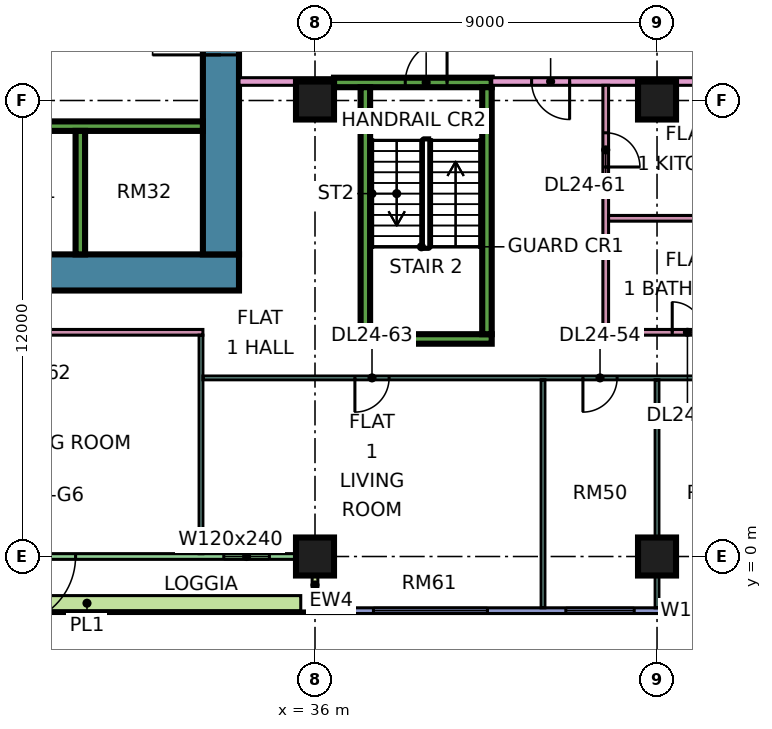
"""IFC4 building model, lengths in metres.
Left out: names, types, materials, properties, quantities, classifications, styles, units other than length and angle.
Written with IfcOpenShell. Run it as: python <this file> out.ifc"""

import sys

from ifc_helpers import new_model, si_unit, direction, frame, frame_2d, origin, origin_2d, place, context, subcontext, project, spatial, rectangle, extrude, element, fill, save


model = new_model("IFC4")
c1 = context("Model", 3, precision=1e-05, world=origin(), true_north=direction((0.0, 1.0)))
c2 = subcontext(c1, "Body", "Model", "MODEL_VIEW")
j1 = project(units=[si_unit("LENGTHUNIT", "METRE"), si_unit("PLANEANGLEUNIT", "RADIAN")], contexts=[c1])
p1 = place(None, origin())
s1 = spatial("IfcSite", under=j1, at=p1, CompositionType="ELEMENT")
p2 = place(p1, origin())
s2 = spatial("IfcBuilding", under=s1, at=p2, CompositionType="ELEMENT")
p3 = place(p2, frame((0.0, 0.0, 106.9)))
s3 = spatial("IfcBuildingStorey", under=s2, at=p3, CompositionType="ELEMENT", Elevation=106.9)
for number, where, z_axis, x_axis in (
    (1, (36.0, 0.0, 0.0), (0.0, 0.0, 1.0), (1.0, 0.0, 0.0)),
    (2, (36.0, 12.0, 0.0), (0.0, 0.0, 1.0), (1.0, 0.0, 0.0)),
    (3, (45.0, 0.0, 0.0), (0.0, 0.0, 1.0), (1.0, 0.0, 0.0)),
    (4, (45.0, 12.0, 0.0), (0.0, 0.0, 1.0), (1.0, 0.0, 0.0)),
):
    element("IfcColumn", number, at=place(p3, frame(where, z_axis=z_axis, x_axis=x_axis)), inside=s3, PredefinedType="COLUMN", context=c2, shape_type="SweptSolid", body=[
        extrude(rectangle(XDim=1.0, YDim=1.0, at=origin_2d()), origin(), (0.0, 0.0, 1.0), 3.75),
    ])
p4 = place(p3, frame((9.0, 7.475, 0.0), z_axis=(0.0, 0.0, 1.0), x_axis=(1.0, 0.0, 0.0)))
e5 = element("IfcWall", 5, at=p4, inside=s3, PredefinedType="SHEAR", context=c2, shape_type="SweptSolid", body=[
    extrude(rectangle(XDim=25.0, YDim=0.95, at=frame_2d((12.5, 0.0))), origin(), (0.0, 0.0, 1.0), 3.75),
])
p5 = place(p3, frame((33.525, 7.95, 0.0), z_axis=(0.0, 0.0, 1.0), x_axis=(0.0, 1.0, 0.0)))
e6 = element("IfcWall", 6, at=p5, inside=s3, PredefinedType="SHEAR", context=c2, shape_type="SweptSolid", body=[
    extrude(rectangle(XDim=11.1, YDim=0.95, at=frame_2d((5.55, 0.0))), origin(), (0.0, 0.0, 1.0), 3.75),
])
p6 = place(p5, frame((5.25, 0.0, 0.0)))
e7 = element("IfcOpeningElement", 7, at=p6, cuts=e6, PredefinedType="OPENING", context=c2, shape_type="SweptSolid", body=[
    extrude(rectangle(XDim=1.8, YDim=2.4, at=frame_2d((0.9, 1.2))), frame((0.0, 0.485, 0.0), z_axis=(0.0, -1.0, 0.0), x_axis=(1.0, 0.0, 0.0)), (0.0, 0.0, 1.0), 0.97),
])
p7 = place(p3, frame((13.45, 11.325, 0.0), z_axis=(0.0, 0.0, 1.0), x_axis=(1.0, 0.0, 0.0)))
e8 = element("IfcWall", 8, at=p7, inside=s3, PredefinedType="SHEAR", context=c2, shape_type="SweptSolid", body=[
    extrude(rectangle(XDim=19.6, YDim=0.25, at=frame_2d((9.8, 0.0))), origin(), (0.0, 0.0, 1.0), 3.75),
])
p8 = place(p7, frame((0.65, 0.0, 0.0)))
e9 = element("IfcOpeningElement", 9, at=p8, cuts=e8, PredefinedType="OPENING", context=c2, shape_type="SweptSolid", body=[
    extrude(rectangle(XDim=1.2, YDim=2.2, at=frame_2d((0.6, 1.1))), frame((0.0, 0.135, 0.0), z_axis=(0.0, -1.0, 0.0), x_axis=(1.0, 0.0, 0.0)), (0.0, 0.0, 1.0), 0.27),
])
p9 = place(p7, frame((3.4, 0.0, 0.0)))
e10 = element("IfcOpeningElement", 10, at=p9, cuts=e8, PredefinedType="OPENING", context=c2, shape_type="SweptSolid", body=[
    extrude(rectangle(XDim=1.2, YDim=2.2, at=frame_2d((0.6, 1.1))), frame((0.0, 0.135, 0.0), z_axis=(0.0, -1.0, 0.0), x_axis=(1.0, 0.0, 0.0)), (0.0, 0.0, 1.0), 0.27),
])
p10 = place(p7, frame((6.15, 0.0, 0.0)))
e11 = element("IfcOpeningElement", 11, at=p10, cuts=e8, PredefinedType="OPENING", context=c2, shape_type="SweptSolid", body=[
    extrude(rectangle(XDim=1.2, YDim=2.2, at=frame_2d((0.6, 1.1))), frame((0.0, 0.135, 0.0), z_axis=(0.0, -1.0, 0.0), x_axis=(1.0, 0.0, 0.0)), (0.0, 0.0, 1.0), 0.27),
])
p11 = place(p7, frame((8.9, 0.0, 0.0)))
e12 = element("IfcOpeningElement", 12, at=p11, cuts=e8, PredefinedType="OPENING", context=c2, shape_type="SweptSolid", body=[
    extrude(rectangle(XDim=1.2, YDim=2.2, at=frame_2d((0.6, 1.1))), frame((0.0, 0.135, 0.0), z_axis=(0.0, -1.0, 0.0), x_axis=(1.0, 0.0, 0.0)), (0.0, 0.0, 1.0), 0.27),
])
p12 = place(p3, frame((29.825, 7.95, 0.0), z_axis=(0.0, 0.0, 1.0), x_axis=(0.0, 1.0, 0.0)))
e13 = element("IfcWall", 13, at=p12, inside=s3, PredefinedType="SHEAR", context=c2, shape_type="SweptSolid", body=[
    extrude(rectangle(XDim=3.25, YDim=0.25, at=frame_2d((1.625, 0.0))), origin(), (0.0, 0.0, 1.0), 3.75),
])
p13 = place(p3, frame((37.2, 5.725, 0.0), z_axis=(0.0, 0.0, 1.0), x_axis=(1.0, 0.0, 0.0)))
e14 = element("IfcWall", 14, at=p13, inside=s3, PredefinedType="SHEAR", context=c2, shape_type="SweptSolid", body=[
    extrude(rectangle(XDim=3.45, YDim=0.25, at=frame_2d((1.725, 0.0))), origin(), (0.0, 0.0, 1.0), 3.75),
])
p14 = place(p3, frame((36.5, 12.475, 0.0), z_axis=(0.0, 0.0, 1.0), x_axis=(1.0, 0.0, 0.0)))
e15 = element("IfcWall", 15, at=p14, inside=s3, PredefinedType="SHEAR", context=c2, shape_type="SweptSolid", body=[
    extrude(rectangle(XDim=4.15, YDim=0.25, at=frame_2d((2.075, 0.0))), origin(), (0.0, 0.0, 1.0), 3.75),
])
p15 = place(p14, frame((1.875, 0.0, 0.0)))
e16 = element("IfcOpeningElement", 16, at=p15, cuts=e15, PredefinedType="OPENING", context=c2, shape_type="SweptSolid", body=[
    extrude(rectangle(XDim=1.1, YDim=2.2, at=frame_2d((0.55, 1.1))), frame((0.0, 0.135, 0.0), z_axis=(0.0, -1.0, 0.0), x_axis=(1.0, 0.0, 0.0)), (0.0, 0.0, 1.0), 0.27),
])
for number, where, z_axis, x_axis in (
    (17, (37.325, 5.85, 0.0), (0.0, 0.0, 1.0), (0.0, 1.0, 0.0)),
    (18, (40.525, 5.85, 0.0), (0.0, 0.0, 1.0), (0.0, 1.0, 0.0)),
):
    element("IfcWall", number, at=place(p3, frame(where, z_axis=z_axis, x_axis=x_axis)), inside=s3, PredefinedType="SHEAR", context=c2, shape_type="SweptSolid", body=[
        extrude(rectangle(XDim=6.5, YDim=0.25, at=frame_2d((3.25, 0.0))), origin(), (0.0, 0.0, 1.0), 3.75),
    ])
p16 = place(p3, frame((24.075, 0.0, 0.0), z_axis=(0.0, 0.0, 1.0), x_axis=(1.0, 0.0, 0.0)))
e19 = element("IfcWall", 19, at=p16, inside=s3, PredefinedType="SOLIDWALL", context=c2, shape_type="SweptSolid", body=[
    extrude(rectangle(XDim=11.85, YDim=0.15, at=frame_2d((5.925, 0.0))), origin(), (0.0, 0.0, 1.0), 3.35),
])
p17 = place(p16, frame((3.825, 0.0, 0.0)))
e20 = element("IfcOpeningElement", 20, at=p17, cuts=e19, PredefinedType="OPENING", context=c2, shape_type="SweptSolid", body=[
    extrude(rectangle(XDim=1.8, YDim=2.4, at=frame_2d((0.9, 1.2))), frame((0.0, 0.085, 0.0), z_axis=(0.0, -1.0, 0.0), x_axis=(1.0, 0.0, 0.0)), (0.0, 0.0, 1.0), 0.17),
])
p18 = place(p16, frame((9.525, 0.0, 0.45)))
e21 = element("IfcOpeningElement", 21, at=p18, cuts=e19, PredefinedType="OPENING", context=c2, shape_type="SweptSolid", body=[
    extrude(rectangle(XDim=1.2, YDim=2.4, at=frame_2d((0.6, 1.2))), frame((0.0, 0.085, 0.0), z_axis=(0.0, -1.0, 0.0), x_axis=(1.0, 0.0, 0.0)), (0.0, 0.0, 1.0), 0.17),
])
p19 = place(p3, frame((36.0, -1.5, 0.0), z_axis=(0.0, 0.0, 1.0), x_axis=(0.0, 1.0, 0.0)))
e22 = element("IfcWall", 22, at=p19, inside=s3, PredefinedType="SOLIDWALL", context=c2, shape_type="SweptSolid", body=[
    extrude(rectangle(XDim=1.5, YDim=0.15, at=frame_2d((0.75, 0.0))), origin(), (0.0, 0.0, 1.0), 3.35),
])
p20 = place(p3, frame((36.075, -1.425, 0.0), z_axis=(0.0, 0.0, 1.0), x_axis=(1.0, 0.0, 0.0)))
e23 = element("IfcWall", 23, at=p20, inside=s3, PredefinedType="SOLIDWALL", context=c2, shape_type="SweptSolid", body=[
    extrude(rectangle(XDim=11.85, YDim=0.15, at=frame_2d((5.925, 0.0))), origin(), (0.0, 0.0, 1.0), 3.35),
])
p21 = place(p20, frame((1.462, 0.0, 0.45)))
e24 = element("IfcOpeningElement", 24, at=p21, cuts=e23, PredefinedType="OPENING", context=c2, shape_type="SweptSolid", body=[
    extrude(rectangle(XDim=3.0, YDim=2.4, at=frame_2d((1.5, 1.2))), frame((0.0, 0.085, 0.0), z_axis=(0.0, -1.0, 0.0), x_axis=(1.0, 0.0, 0.0)), (0.0, 0.0, 1.0), 0.17),
])
p22 = place(p20, frame((6.525, 0.0, 0.45)))
e25 = element("IfcOpeningElement", 25, at=p22, cuts=e23, PredefinedType="OPENING", context=c2, shape_type="SweptSolid", body=[
    extrude(rectangle(XDim=1.8, YDim=2.4, at=frame_2d((0.9, 1.2))), frame((0.0, 0.085, 0.0), z_axis=(0.0, -1.0, 0.0), x_axis=(1.0, 0.0, 0.0)), (0.0, 0.0, 1.0), 0.17),
])
p23 = place(p20, frame((9.488, 0.0, 0.45)))
e26 = element("IfcOpeningElement", 26, at=p23, cuts=e23, PredefinedType="OPENING", context=c2, shape_type="SweptSolid", body=[
    extrude(rectangle(XDim=1.8, YDim=2.4, at=frame_2d((0.9, 1.2))), frame((0.0, 0.085, 0.0), z_axis=(0.0, -1.0, 0.0), x_axis=(1.0, 0.0, 0.0)), (0.0, 0.0, 1.0), 0.17),
])
p24 = place(p3, frame((24.375, -1.229, 0.0), z_axis=(0.0, 0.0, 1.0), x_axis=(1.0, 0.0, 0.0)))
e27 = element("IfcWall", 27, at=p24, inside=s3, PredefinedType="SOLIDWALL", context=c2, shape_type="SweptSolid", body=[
    extrude(rectangle(XDim=11.25, YDim=0.4, at=frame_2d((5.625, 0.0))), origin(), (0.0, 0.0, 1.0), 0.7),
])
p25 = place(p3, frame((11.95, 5.9, 0.0), z_axis=(0.0, 0.0, 1.0), x_axis=(1.0, 0.0, 0.0)))
e28 = element("IfcWall", 28, at=p25, inside=s3, PredefinedType="PARTITIONING", context=c2, shape_type="SweptSolid", body=[
    extrude(rectangle(XDim=21.1, YDim=0.15, at=frame_2d((10.55, 0.0))), origin(), (0.0, 0.0, 1.0), 3.35),
])
p26 = place(p25, frame((1.1, 0.0, 0.0)))
e29 = element("IfcOpeningElement", 29, at=p26, cuts=e28, PredefinedType="OPENING", context=c2, shape_type="SweptSolid", body=[
    extrude(rectangle(XDim=0.9, YDim=2.1, at=frame_2d((0.45, 1.05))), frame((0.0, 0.085, 0.0), z_axis=(0.0, -1.0, 0.0), x_axis=(1.0, 0.0, 0.0)), (0.0, 0.0, 1.0), 0.17),
])
p27 = place(p25, frame((4.1, 0.0, 0.0)))
e30 = element("IfcOpeningElement", 30, at=p27, cuts=e28, PredefinedType="OPENING", context=c2, shape_type="SweptSolid", body=[
    extrude(rectangle(XDim=0.9, YDim=2.1, at=frame_2d((0.45, 1.05))), frame((0.0, 0.085, 0.0), z_axis=(0.0, -1.0, 0.0), x_axis=(1.0, 0.0, 0.0)), (0.0, 0.0, 1.0), 0.17),
])
p28 = place(p25, frame((10.1, 0.0, 0.0)))
e31 = element("IfcOpeningElement", 31, at=p28, cuts=e28, PredefinedType="OPENING", context=c2, shape_type="SweptSolid", body=[
    extrude(rectangle(XDim=0.9, YDim=2.1, at=frame_2d((0.45, 1.05))), frame((0.0, 0.085, 0.0), z_axis=(0.0, -1.0, 0.0), x_axis=(1.0, 0.0, 0.0)), (0.0, 0.0, 1.0), 0.17),
])
p29 = place(p25, frame((16.1, 0.0, 0.0)))
e32 = element("IfcOpeningElement", 32, at=p29, cuts=e28, PredefinedType="OPENING", context=c2, shape_type="SweptSolid", body=[
    extrude(rectangle(XDim=0.9, YDim=2.1, at=frame_2d((0.45, 1.05))), frame((0.0, 0.085, 0.0), z_axis=(0.0, -1.0, 0.0), x_axis=(1.0, 0.0, 0.0)), (0.0, 0.0, 1.0), 0.17),
])
p30 = place(p3, frame((33.0, 0.074, 0.0), z_axis=(0.0, 0.0, 1.0), x_axis=(0.0, 1.0, 0.0)))
e33 = element("IfcWall", 33, at=p30, inside=s3, PredefinedType="PARTITIONING", context=c2, shape_type="SweptSolid", body=[
    extrude(rectangle(XDim=5.751, YDim=0.1, at=frame_2d((2.875, 0.0))), origin(), (0.0, 0.0, 1.0), 3.35),
])
p31 = place(p3, frame((33.05, 4.7, 0.0), z_axis=(0.0, 0.0, 1.0), x_axis=(1.0, 0.0, 0.0)))
e34 = element("IfcWall", 34, at=p31, inside=s3, PredefinedType="PARTITIONING", context=c2, shape_type="SweptSolid", body=[
    extrude(rectangle(XDim=14.85, YDim=0.1, at=frame_2d((7.425, 0.0))), origin(), (0.0, 0.0, 1.0), 3.35),
])
p32 = place(p31, frame((10.0, 0.0, 0.0)))
e35 = element("IfcOpeningElement", 35, at=p32, cuts=e34, PredefinedType="OPENING", context=c2, shape_type="SweptSolid", body=[
    extrude(rectangle(XDim=0.9, YDim=2.1, at=frame_2d((0.45, 1.05))), frame((0.0, 0.06, 0.0), z_axis=(0.0, -1.0, 0.0), x_axis=(1.0, 0.0, 0.0)), (0.0, 0.0, 1.0), 0.12),
])
p33 = place(p31, frame((13.0, 0.0, 0.0)))
e36 = element("IfcOpeningElement", 36, at=p33, cuts=e34, PredefinedType="OPENING", context=c2, shape_type="SweptSolid", body=[
    extrude(rectangle(XDim=0.9, YDim=2.1, at=frame_2d((0.45, 1.05))), frame((0.0, 0.06, 0.0), z_axis=(0.0, -1.0, 0.0), x_axis=(1.0, 0.0, 0.0)), (0.0, 0.0, 1.0), 0.12),
])
p34 = place(p31, frame((4.0, 0.0, 0.0)))
e37 = element("IfcOpeningElement", 37, at=p34, cuts=e34, PredefinedType="OPENING", context=c2, shape_type="SweptSolid", body=[
    extrude(rectangle(XDim=0.9, YDim=2.1, at=frame_2d((0.45, 1.05))), frame((0.0, 0.06, 0.0), z_axis=(0.0, -1.0, 0.0), x_axis=(1.0, 0.0, 0.0)), (0.0, 0.0, 1.0), 0.12),
])
p35 = place(p3, frame((34.0, 12.5, 0.0), z_axis=(0.0, 0.0, 1.0), x_axis=(1.0, 0.0, 0.0)))
e38 = element("IfcWall", 38, at=p35, inside=s3, PredefinedType="PARTITIONING", context=c2, shape_type="SweptSolid", body=[
    extrude(rectangle(XDim=2.501, YDim=0.2, at=frame_2d((1.25, 0.0))), origin(), (0.0, 0.0, 1.0), 3.35),
])
p36 = place(p3, frame((40.65, 12.5, 0.0), z_axis=(0.0, 0.0, 1.0), x_axis=(1.0, 0.0, 0.0)))
e39 = element("IfcWall", 39, at=p36, inside=s3, PredefinedType="PARTITIONING", context=c2, shape_type="SweptSolid", body=[
    extrude(rectangle(XDim=31.35, YDim=0.2, at=frame_2d((15.675, 0.0))), origin(), (0.0, 0.0, 1.0), 3.35),
])
p37 = place(p36, frame((17.1, 0.0, 0.0)))
e40 = element("IfcOpeningElement", 40, at=p37, cuts=e39, PredefinedType="OPENING", context=c2, shape_type="SweptSolid", body=[
    extrude(rectangle(XDim=1.0, YDim=2.1, at=frame_2d((0.5, 1.05))), frame((0.0, 0.11, 0.0), z_axis=(0.0, -1.0, 0.0), x_axis=(1.0, 0.0, 0.0)), (0.0, 0.0, 1.0), 0.22),
])
p38 = place(p36, frame((23.7, 0.0, 0.0)))
e41 = element("IfcOpeningElement", 41, at=p38, cuts=e39, PredefinedType="OPENING", context=c2, shape_type="SweptSolid", body=[
    extrude(rectangle(XDim=1.0, YDim=2.1, at=frame_2d((0.5, 1.05))), frame((0.0, 0.11, 0.0), z_axis=(0.0, -1.0, 0.0), x_axis=(1.0, 0.0, 0.0)), (0.0, 0.0, 1.0), 0.22),
])
p39 = place(p36, frame((1.05, 0.0, 0.0)))
e42 = element("IfcOpeningElement", 42, at=p39, cuts=e39, PredefinedType="OPENING", context=c2, shape_type="SweptSolid", body=[
    extrude(rectangle(XDim=1.0, YDim=2.1, at=frame_2d((0.5, 1.05))), frame((0.0, 0.11, 0.0), z_axis=(0.0, -1.0, 0.0), x_axis=(1.0, 0.0, 0.0)), (0.0, 0.0, 1.0), 0.22),
])
p40 = place(p3, frame((42.0, -1.35, 0.0), z_axis=(0.0, 0.0, 1.0), x_axis=(0.0, 1.0, 0.0)))
e43 = element("IfcWall", 43, at=p40, inside=s3, PredefinedType="PARTITIONING", context=c2, shape_type="SweptSolid", body=[
    extrude(rectangle(XDim=6.0, YDim=0.1, at=frame_2d((3.0, 0.0))), origin(), (0.0, 0.0, 1.0), 3.35),
])
p41 = place(p3, frame((43.65, 5.825, 0.0), z_axis=(0.0, 0.0, 1.0), x_axis=(0.0, 1.0, 0.0)))
e44 = element("IfcWall", 44, at=p41, inside=s3, PredefinedType="PARTITIONING", context=c2, shape_type="SweptSolid", body=[
    extrude(rectangle(XDim=6.575, YDim=0.15, at=frame_2d((3.288, 0.0))), origin(), (0.0, 0.0, 1.0), 3.35),
])
p42 = place(p41, frame((4.425, 0.0, 0.0)))
e45 = element("IfcOpeningElement", 45, at=p42, cuts=e44, PredefinedType="OPENING", context=c2, shape_type="SweptSolid", body=[
    extrude(rectangle(XDim=0.9, YDim=2.1, at=frame_2d((0.45, 1.05))), frame((0.0, 0.085, 0.0), z_axis=(0.0, -1.0, 0.0), x_axis=(1.0, 0.0, 0.0)), (0.0, 0.0, 1.0), 0.17),
])
p43 = place(p3, frame((43.725, 5.9, 0.0), z_axis=(0.0, 0.0, 1.0), x_axis=(1.0, 0.0, 0.0)))
e46 = element("IfcWall", 46, at=p43, inside=s3, PredefinedType="PARTITIONING", context=c2, shape_type="SweptSolid", body=[
    extrude(rectangle(XDim=4.175, YDim=0.15, at=frame_2d((2.087, 0.0))), origin(), (0.0, 0.0, 1.0), 3.35),
])
p44 = place(p43, frame((1.675, 0.0, 0.0)))
e47 = element("IfcOpeningElement", 47, at=p44, cuts=e46, PredefinedType="OPENING", context=c2, shape_type="SweptSolid", body=[
    extrude(rectangle(XDim=0.8, YDim=2.1, at=frame_2d((0.4, 1.05))), frame((0.0, 0.085, 0.0), z_axis=(0.0, -1.0, 0.0), x_axis=(1.0, 0.0, 0.0)), (0.0, 0.0, 1.0), 0.17),
])
p45 = place(p3, frame((43.725, 8.9, 0.0), z_axis=(0.0, 0.0, 1.0), x_axis=(1.0, 0.0, 0.0)))
e48 = element("IfcWall", 48, at=p45, inside=s3, PredefinedType="PARTITIONING", context=c2, shape_type="SweptSolid", body=[
    extrude(rectangle(XDim=4.175, YDim=0.15, at=frame_2d((2.087, 0.0))), origin(), (0.0, 0.0, 1.0), 3.35),
])
p46 = place(p3, frame((45.0, -1.351, 0.0), z_axis=(0.0, 0.0, 1.0), x_axis=(0.0, 1.0, 0.0)))
e49 = element("IfcWall", 49, at=p46, inside=s3, PredefinedType="PARTITIONING", context=c2, shape_type="SweptSolid", body=[
    extrude(rectangle(XDim=6.001, YDim=0.1, at=frame_2d((3.0, 0.0))), origin(), (0.0, 0.0, 1.0), 3.35),
])
p47 = place(p17, frame((1.8, 0.0, 0.0), z_axis=(0.0, 0.0, 1.0), x_axis=(-1.0, 0.0, 0.0)))
e50 = element("IfcDoor", 50, at=p47, inside=s3, OperationType="DOUBLE_DOOR_SINGLE_SWING", PredefinedType="DOOR", context=c2, shape_type="SweptSolid", body=[
    extrude(rectangle(XDim=1.8, YDim=2.4, at=frame_2d((0.9, 1.2))), frame((0.0, 0.025, 0.0), z_axis=(0.0, -1.0, 0.0), x_axis=(1.0, 0.0, 0.0)), (0.0, 0.0, 1.0), 0.05),
])
fill(e20, e50)
p48 = place(p18, origin())
e51 = element("IfcWindow", 51, at=p48, inside=s3, PartitioningType="SINGLE_PANEL", PredefinedType="WINDOW", context=c2, shape_type="SweptSolid", body=[
    extrude(rectangle(XDim=1.2, YDim=2.4, at=frame_2d((0.6, 1.2))), frame((0.0, 0.03, 0.0), z_axis=(0.0, -1.0, 0.0), x_axis=(1.0, 0.0, 0.0)), (0.0, 0.0, 1.0), 0.06),
])
fill(e21, e51)
p49 = place(p21, origin())
e52 = element("IfcWindow", 52, at=p49, inside=s3, PartitioningType="SINGLE_PANEL", PredefinedType="WINDOW", context=c2, shape_type="SweptSolid", body=[
    extrude(rectangle(XDim=3.0, YDim=2.4, at=frame_2d((1.5, 1.2))), frame((0.0, 0.03, 0.0), z_axis=(0.0, -1.0, 0.0), x_axis=(1.0, 0.0, 0.0)), (0.0, 0.0, 1.0), 0.06),
])
fill(e24, e52)
p50 = place(p22, origin())
e53 = element("IfcWindow", 53, at=p50, inside=s3, PartitioningType="SINGLE_PANEL", PredefinedType="WINDOW", context=c2, shape_type="SweptSolid", body=[
    extrude(rectangle(XDim=1.8, YDim=2.4, at=frame_2d((0.9, 1.2))), frame((0.0, 0.03, 0.0), z_axis=(0.0, -1.0, 0.0), x_axis=(1.0, 0.0, 0.0)), (0.0, 0.0, 1.0), 0.06),
])
fill(e25, e53)
p51 = place(p23, origin())
e54 = element("IfcWindow", 54, at=p51, inside=s3, PartitioningType="SINGLE_PANEL", PredefinedType="WINDOW", context=c2, shape_type="SweptSolid", body=[
    extrude(rectangle(XDim=1.8, YDim=2.4, at=frame_2d((0.9, 1.2))), frame((0.0, 0.03, 0.0), z_axis=(0.0, -1.0, 0.0), x_axis=(1.0, 0.0, 0.0)), (0.0, 0.0, 1.0), 0.06),
])
fill(e26, e54)
p52 = place(p6, origin())
e55 = element("IfcDoor", 55, at=p52, inside=s3, OperationType="DOUBLE_DOOR_SINGLE_SWING", PredefinedType="DOOR", context=c2, shape_type="SweptSolid", body=[
    extrude(rectangle(XDim=1.8, YDim=2.4, at=frame_2d((0.9, 1.2))), frame((0.0, 0.025, 0.0), z_axis=(0.0, -1.0, 0.0), x_axis=(1.0, 0.0, 0.0)), (0.0, 0.0, 1.0), 0.05),
])
fill(e7, e55)
p53 = place(p15, frame((1.1, 0.0, 0.0), z_axis=(0.0, 0.0, 1.0), x_axis=(-1.0, 0.0, 0.0)))
e56 = element("IfcDoor", 56, at=p53, inside=s3, OperationType="SINGLE_SWING_RIGHT", PredefinedType="DOOR", context=c2, shape_type="SweptSolid", body=[
    extrude(rectangle(XDim=1.1, YDim=2.2, at=frame_2d((0.55, 1.1))), frame((0.0, 0.025, 0.0), z_axis=(0.0, -1.0, 0.0), x_axis=(1.0, 0.0, 0.0)), (0.0, 0.0, 1.0), 0.05),
])
fill(e16, e56)
p54 = place(p44, origin())
e57 = element("IfcDoor", 57, at=p54, inside=s3, OperationType="SINGLE_SWING_LEFT", PredefinedType="DOOR", context=c2, shape_type="SweptSolid", body=[
    extrude(rectangle(XDim=0.8, YDim=2.1, at=frame_2d((0.4, 1.05))), frame((0.0, 0.025, 0.0), z_axis=(0.0, -1.0, 0.0), x_axis=(1.0, 0.0, 0.0)), (0.0, 0.0, 1.0), 0.05),
])
fill(e47, e57)
p55 = place(p32, frame((0.9, 0.0, 0.0), z_axis=(0.0, 0.0, 1.0), x_axis=(-1.0, 0.0, 0.0)))
e58 = element("IfcDoor", 58, at=p55, inside=s3, OperationType="SINGLE_SWING_LEFT", PredefinedType="DOOR", context=c2, shape_type="SweptSolid", body=[
    extrude(rectangle(XDim=0.9, YDim=2.1, at=frame_2d((0.45, 1.05))), frame((0.0, 0.025, 0.0), z_axis=(0.0, -1.0, 0.0), x_axis=(1.0, 0.0, 0.0)), (0.0, 0.0, 1.0), 0.05),
])
fill(e35, e58)
p56 = place(p39, origin())
e59 = element("IfcDoor", 59, at=p56, inside=s3, OperationType="SINGLE_SWING_RIGHT", PredefinedType="DOOR", context=c2, shape_type="SweptSolid", body=[
    extrude(rectangle(XDim=1.0, YDim=2.1, at=frame_2d((0.5, 1.05))), frame((0.0, 0.025, 0.0), z_axis=(0.0, -1.0, 0.0), x_axis=(1.0, 0.0, 0.0)), (0.0, 0.0, 1.0), 0.05),
])
fill(e42, e59)
p57 = place(p42, frame((0.9, 0.0, 0.0), z_axis=(0.0, 0.0, 1.0), x_axis=(-1.0, 0.0, 0.0)))
e60 = element("IfcDoor", 60, at=p57, inside=s3, OperationType="SINGLE_SWING_LEFT", PredefinedType="DOOR", context=c2, shape_type="SweptSolid", body=[
    extrude(rectangle(XDim=0.9, YDim=2.1, at=frame_2d((0.45, 1.05))), frame((0.0, 0.025, 0.0), z_axis=(0.0, -1.0, 0.0), x_axis=(1.0, 0.0, 0.0)), (0.0, 0.0, 1.0), 0.05),
])
fill(e45, e60)
p58 = place(p34, frame((0.9, 0.0, 0.0), z_axis=(0.0, 0.0, 1.0), x_axis=(-1.0, 0.0, 0.0)))
e61 = element("IfcDoor", 61, at=p58, inside=s3, OperationType="SINGLE_SWING_LEFT", PredefinedType="DOOR", context=c2, shape_type="SweptSolid", body=[
    extrude(rectangle(XDim=0.9, YDim=2.1, at=frame_2d((0.45, 1.05))), frame((0.0, 0.025, 0.0), z_axis=(0.0, -1.0, 0.0), x_axis=(1.0, 0.0, 0.0)), (0.0, 0.0, 1.0), 0.05),
])
fill(e37, e61)
save(model, sys.argv[1])
